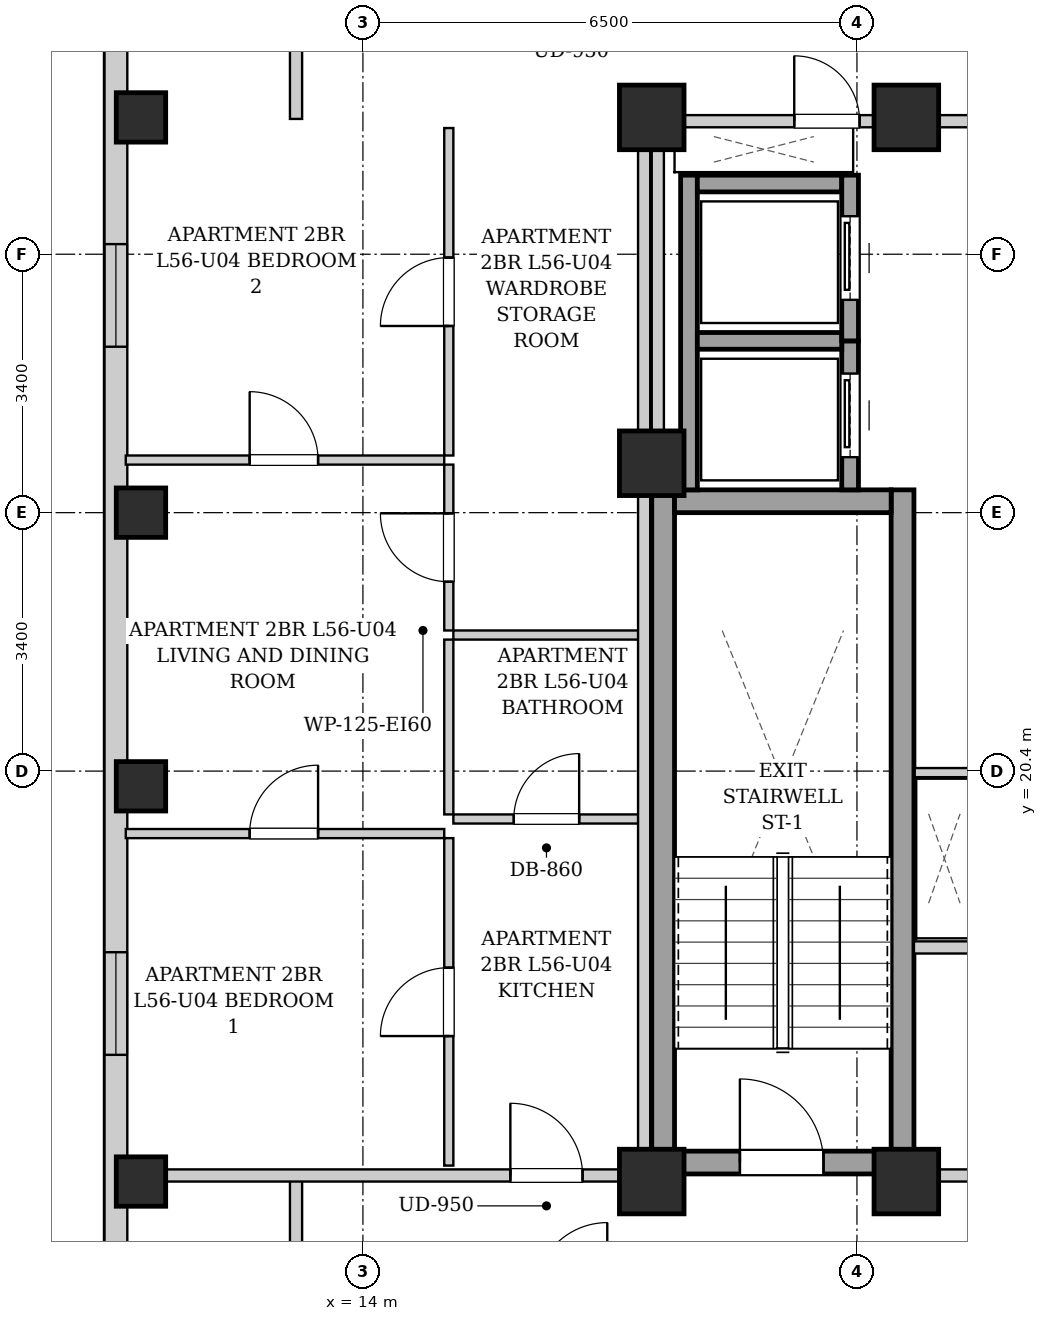
"""IFC4 building model, lengths in metres.
Left out: names, types, materials, properties, quantities, classifications, styles, units other than length and angle.
Written with IfcOpenShell. Run it as: python <this file> out.ifc"""

import sys

from ifc_helpers import new_model, si_unit, direction, frame, frame_2d, origin, origin_2d, place, context, subcontext, project, spatial, rectangle, extrude, element, fill, save


model = new_model("IFC4")
c1 = context("Model", 3, precision=1e-05, world=origin(), true_north=direction((0.0, 1.0)))
c2 = subcontext(c1, "Body", "Model", "MODEL_VIEW")
j1 = project(units=[si_unit("LENGTHUNIT", "METRE"), si_unit("PLANEANGLEUNIT", "RADIAN")], contexts=[c1])
p1 = place(None, origin())
s1 = spatial("IfcSite", under=j1, at=p1, CompositionType="ELEMENT")
p2 = place(p1, origin())
s2 = spatial("IfcBuilding", under=s1, at=p2, CompositionType="ELEMENT")
p3 = place(p2, frame((0.0, 0.0, 194.2)))
s3 = spatial("IfcBuildingStorey", under=s2, at=p3, CompositionType="ELEMENT", Elevation=194.2)
for number, where, z_axis, x_axis in (
    (1, (11.08, 15.0, 0.0), (0.0, 0.0, 1.0), (1.0, 0.0, 0.0)),
    (2, (11.08, 20.2, 0.0), (0.0, 0.0, 1.0), (1.0, 0.0, 0.0)),
    (3, (11.08, 23.8, 0.0), (0.0, 0.0, 1.0), (1.0, 0.0, 0.0)),
    (4, (11.08, 29.0, 0.0), (0.0, 0.0, 1.0), (1.0, 0.0, 0.0)),
):
    element("IfcColumn", number, at=place(p3, frame(where, z_axis=z_axis, x_axis=x_axis)), inside=s3, PredefinedType="COLUMN", context=c2, shape_type="SweptSolid", body=[
        extrude(rectangle(XDim=0.65, YDim=0.65, at=origin_2d()), origin(), (0.0, 0.0, 1.0), 3.3),
    ])
for number, where, z_axis, x_axis in (
    (5, (17.8, 15.0, 0.0), (0.0, 0.0, 1.0), (1.0, 0.0, 0.0)),
    (6, (21.15, 15.0, 0.0), (0.0, 0.0, 1.0), (1.0, 0.0, 0.0)),
    (7, (17.8, 29.0, 0.0), (0.0, 0.0, 1.0), (1.0, 0.0, 0.0)),
    (8, (21.15, 29.0, 0.0), (0.0, 0.0, 1.0), (1.0, 0.0, 0.0)),
    (9, (17.8, 24.45, 0.0), (0.0, 0.0, 1.0), (1.0, 0.0, 0.0)),
):
    element("IfcColumn", number, at=place(p3, frame(where, z_axis=z_axis, x_axis=x_axis)), inside=s3, PredefinedType="COLUMN", context=c2, shape_type="SweptSolid", body=[
        extrude(rectangle(XDim=0.85, YDim=0.85, at=origin_2d()), origin(), (0.0, 0.0, 1.0), 3.3),
    ])
p4 = place(p3, frame((10.75, 6.3, 0.0), z_axis=(0.0, 0.0, 1.0), x_axis=(0.0, 1.0, 0.0)))
e10 = element("IfcWall", 10, at=p4, inside=s3, PredefinedType="SOLIDWALL", context=c2, shape_type="SweptSolid", body=[
    extrude(rectangle(XDim=31.4, YDim=0.3, at=frame_2d((15.7, 0.0))), origin(), (0.0, 0.0, 1.0), 3.04),
])
p5 = place(p4, frame((1.653, 0.0, 0.55)))
e11 = element("IfcOpeningElement", 11, at=p5, cuts=e10, PredefinedType="OPENING", context=c2, shape_type="SweptSolid", body=[
    extrude(rectangle(XDim=1.35, YDim=1.2, at=frame_2d((0.675, 0.6))), frame((0.0, 0.16, 0.0), z_axis=(0.0, -1.0, 0.0), x_axis=(1.0, 0.0, 0.0)), (0.0, 0.0, 1.0), 0.32),
])
p6 = place(p4, frame((28.396, 0.0, 0.55)))
e12 = element("IfcOpeningElement", 12, at=p6, cuts=e10, PredefinedType="OPENING", context=c2, shape_type="SweptSolid", body=[
    extrude(rectangle(XDim=1.35, YDim=1.2, at=frame_2d((0.675, 0.6))), frame((0.0, 0.16, 0.0), z_axis=(0.0, -1.0, 0.0), x_axis=(1.0, 0.0, 0.0)), (0.0, 0.0, 1.0), 0.32),
])
p7 = place(p4, frame((10.367, 0.0, 0.55)))
e13 = element("IfcOpeningElement", 13, at=p7, cuts=e10, PredefinedType="OPENING", context=c2, shape_type="SweptSolid", body=[
    extrude(rectangle(XDim=1.35, YDim=1.2, at=frame_2d((0.675, 0.6))), frame((0.0, 0.16, 0.0), z_axis=(0.0, -1.0, 0.0), x_axis=(1.0, 0.0, 0.0)), (0.0, 0.0, 1.0), 0.32),
])
p8 = place(p4, frame((19.683, 0.0, 0.55)))
e14 = element("IfcOpeningElement", 14, at=p8, cuts=e10, PredefinedType="OPENING", context=c2, shape_type="SweptSolid", body=[
    extrude(rectangle(XDim=1.35, YDim=1.2, at=frame_2d((0.675, 0.6))), frame((0.0, 0.16, 0.0), z_axis=(0.0, -1.0, 0.0), x_axis=(1.0, 0.0, 0.0)), (0.0, 0.0, 1.0), 0.32),
])
for number, where, z_axis, x_axis in (
    (15, (17.95, 15.1, 0.0), (0.0, 0.0, 1.0), (0.0, 1.0, 0.0)),
    (16, (21.1, 15.1, 0.0), (0.0, 0.0, 1.0), (0.0, 1.0, 0.0)),
):
    element("IfcWall", number, at=place(p3, frame(where, z_axis=z_axis, x_axis=x_axis)), inside=s3, PredefinedType="SHEAR", context=c2, shape_type="SweptSolid", body=[
        extrude(rectangle(XDim=9.0, YDim=0.3, at=frame_2d((4.5, 0.0))), origin(), (0.0, 0.0, 1.0), 3.04),
    ])
p9 = place(p3, frame((18.1, 23.95, 0.0), z_axis=(0.0, 0.0, 1.0), x_axis=(1.0, 0.0, 0.0)))
e17 = element("IfcWall", 17, at=p9, inside=s3, PredefinedType="SHEAR", context=c2, shape_type="SweptSolid", body=[
    extrude(rectangle(XDim=2.85, YDim=0.3, at=frame_2d((1.425, 0.0))), origin(), (0.0, 0.0, 1.0), 3.04),
])
p10 = place(p3, frame((18.1, 15.25, 0.0), z_axis=(0.0, 0.0, 1.0), x_axis=(1.0, 0.0, 0.0)))
e18 = element("IfcWall", 18, at=p10, inside=s3, PredefinedType="SHEAR", context=c2, shape_type="SweptSolid", body=[
    extrude(rectangle(XDim=2.85, YDim=0.3, at=frame_2d((1.425, 0.0))), origin(), (0.0, 0.0, 1.0), 3.04),
])
p11 = place(p10, frame((0.86, 0.0, 0.0)))
e19 = element("IfcOpeningElement", 19, at=p11, cuts=e18, PredefinedType="OPENING", context=c2, shape_type="SweptSolid", body=[
    extrude(rectangle(XDim=1.1, YDim=2.05, at=frame_2d((0.55, 1.025))), frame((0.0, 0.16, 0.0), z_axis=(0.0, -1.0, 0.0), x_axis=(1.0, 0.0, 0.0)), (0.0, 0.0, 1.0), 0.32),
])
p12 = place(p3, frame((18.29, 24.1, 0.0), z_axis=(0.0, 0.0, 1.0), x_axis=(0.0, 1.0, 0.0)))
e20 = element("IfcWall", 20, at=p12, inside=s3, PredefinedType="SHEAR", context=c2, shape_type="SweptSolid", body=[
    extrude(rectangle(XDim=4.14, YDim=0.22, at=frame_2d((2.07, 0.0))), origin(), (0.0, 0.0, 1.0), 3.04),
])
p13 = place(p3, frame((20.41, 24.1, 0.0), z_axis=(0.0, 0.0, 1.0), x_axis=(0.0, 1.0, 0.0)))
e21 = element("IfcWall", 21, at=p13, inside=s3, PredefinedType="SHEAR", context=c2, shape_type="SweptSolid", body=[
    extrude(rectangle(XDim=1.96, YDim=0.22, at=frame_2d((0.98, 0.0))), origin(), (0.0, 0.0, 1.0), 3.04),
])
p14 = place(p13, frame((0.43, 0.0, 0.0)))
e22 = element("IfcOpeningElement", 22, at=p14, cuts=e21, PredefinedType="OPENING", context=c2, shape_type="SweptSolid", body=[
    extrude(rectangle(XDim=1.1, YDim=2.15, at=frame_2d((0.55, 1.075))), frame((0.0, 0.12, 0.0), z_axis=(0.0, -1.0, 0.0), x_axis=(1.0, 0.0, 0.0)), (0.0, 0.0, 1.0), 0.24),
])
for number, where, z_axis, x_axis in (
    (23, (18.4, 26.06, 0.0), (0.0, 0.0, 1.0), (1.0, 0.0, 0.0)),
    (24, (18.4, 28.13, 0.0), (0.0, 0.0, 1.0), (1.0, 0.0, 0.0)),
):
    element("IfcWall", number, at=place(p3, frame(where, z_axis=z_axis, x_axis=x_axis)), inside=s3, PredefinedType="SHEAR", context=c2, shape_type="SweptSolid", body=[
        extrude(rectangle(XDim=1.9, YDim=0.22, at=frame_2d((0.95, 0.0))), origin(), (0.0, 0.0, 1.0), 3.04),
    ])
p15 = place(p3, frame((20.41, 26.06, 0.0), z_axis=(0.0, 0.0, 1.0), x_axis=(0.0, 1.0, 0.0)))
e25 = element("IfcWall", 25, at=p15, inside=s3, PredefinedType="SHEAR", context=c2, shape_type="SweptSolid", body=[
    extrude(rectangle(XDim=2.18, YDim=0.22, at=frame_2d((1.09, 0.0))), origin(), (0.0, 0.0, 1.0), 3.04),
])
p16 = place(p15, frame((0.54, 0.0, 0.0)))
e26 = element("IfcOpeningElement", 26, at=p16, cuts=e25, PredefinedType="OPENING", context=c2, shape_type="SweptSolid", body=[
    extrude(rectangle(XDim=1.1, YDim=2.15, at=frame_2d((0.55, 1.075))), frame((0.0, 0.12, 0.0), z_axis=(0.0, -1.0, 0.0), x_axis=(1.0, 0.0, 0.0)), (0.0, 0.0, 1.0), 0.24),
])
p17 = place(p3, frame((21.25, 15.08, 0.0), z_axis=(0.0, 0.0, 1.0), x_axis=(1.0, 0.0, 0.0)))
e27 = element("IfcWall", 27, at=p17, inside=s3, PredefinedType="PARTITIONING", context=c2, shape_type="SweptSolid", body=[
    extrude(rectangle(XDim=8.5, YDim=0.16, at=frame_2d((4.25, 0.0))), origin(), (0.0, 0.0, 1.0), 2.556),
])
p18 = place(p17, frame((3.725, 0.0, 0.0)))
e28 = element("IfcOpeningElement", 28, at=p18, cuts=e27, PredefinedType="OPENING", context=c2, shape_type="SweptSolid", body=[
    extrude(rectangle(XDim=1.05, YDim=2.05, at=frame_2d((0.525, 1.025))), frame((0.0, 0.09, 0.0), z_axis=(0.0, -1.0, 0.0), x_axis=(1.0, 0.0, 0.0)), (0.0, 0.0, 1.0), 0.18),
])
p19 = place(p3, frame((21.25, 18.08, 0.0), z_axis=(0.0, 0.0, 1.0), x_axis=(1.0, 0.0, 0.0)))
e29 = element("IfcWall", 29, at=p19, inside=s3, PredefinedType="PARTITIONING", context=c2, shape_type="SweptSolid", body=[
    extrude(rectangle(XDim=1.1, YDim=0.16, at=frame_2d((0.55, 0.0))), origin(), (0.0, 0.0, 1.0), 3.04),
])
p20 = place(p3, frame((17.88, 24.12, 0.0), z_axis=(0.0, 0.0, 1.0), x_axis=(0.0, 1.0, 0.0)))
e30 = element("IfcWall", 30, at=p20, inside=s3, PredefinedType="PARTITIONING", context=c2, shape_type="SweptSolid", body=[
    extrude(rectangle(XDim=4.76, YDim=0.16, at=frame_2d((2.38, 0.0))), origin(), (0.0, 0.0, 1.0), 3.04),
])
p21 = place(p3, frame((17.96, 28.95, 0.0), z_axis=(0.0, 0.0, 1.0), x_axis=(1.0, 0.0, 0.0)))
e31 = element("IfcWall", 31, at=p21, inside=s3, PredefinedType="PARTITIONING", context=c2, shape_type="SweptSolid", body=[
    extrude(rectangle(XDim=4.29, YDim=0.16, at=frame_2d((2.145, 0.0))), origin(), (0.0, 0.0, 1.0), 2.556),
])
p22 = place(p21, frame((1.715, 0.0, 0.0)))
e32 = element("IfcOpeningElement", 32, at=p22, cuts=e31, PredefinedType="OPENING", context=c2, shape_type="SweptSolid", body=[
    extrude(rectangle(XDim=0.86, YDim=2.05, at=frame_2d((0.43, 1.025))), frame((0.0, 0.09, 0.0), z_axis=(0.0, -1.0, 0.0), x_axis=(1.0, 0.0, 0.0)), (0.0, 0.0, 1.0), 0.18),
])
p23 = place(p3, frame((22.28, 20.38, 0.0), z_axis=(0.0, 0.0, 1.0), x_axis=(-1.0, 0.0, 0.0)))
e33 = element("IfcWall", 33, at=p23, inside=s3, PredefinedType="PARTITIONING", context=c2, shape_type="SweptSolid", body=[
    extrude(rectangle(XDim=1.02, YDim=0.12, at=frame_2d((0.51, 0.0))), origin(), (0.0, 0.0, 1.0), 3.04),
])
for number, where, z_axis, x_axis in (
    (34, (13.12, 13.51, 0.0), (0.0, 0.0, 1.0), (0.0, 1.0, 0.0)),
    (35, (13.12, 28.98, 0.0), (0.0, 0.0, 1.0), (0.0, 1.0, 0.0)),
):
    element("IfcWall", number, at=place(p3, frame(where, z_axis=z_axis, x_axis=x_axis)), inside=s3, PredefinedType="PARTITIONING", context=c2, shape_type="SweptSolid", body=[
        extrude(rectangle(XDim=1.58, YDim=0.16, at=frame_2d((0.79, 0.0))), origin(), (0.0, 0.0, 1.0), 3.04),
    ])
p24 = place(p3, frame((10.88, 15.08, 0.0), z_axis=(0.0, 0.0, 1.0), x_axis=(1.0, 0.0, 0.0)))
e36 = element("IfcWall", 36, at=p24, inside=s3, PredefinedType="PARTITIONING", context=c2, shape_type="SweptSolid", body=[
    extrude(rectangle(XDim=6.88, YDim=0.16, at=frame_2d((3.44, 0.0))), origin(), (0.0, 0.0, 1.0), 2.556),
])
p25 = place(p24, frame((5.06, 0.0, 0.0)))
e37 = element("IfcOpeningElement", 37, at=p25, cuts=e36, PredefinedType="OPENING", context=c2, shape_type="SweptSolid", body=[
    extrude(rectangle(XDim=0.95, YDim=2.1, at=frame_2d((0.475, 1.05))), frame((0.0, 0.09, 0.0), z_axis=(0.0, -1.0, 0.0), x_axis=(1.0, 0.0, 0.0)), (0.0, 0.0, 1.0), 0.18),
])
p26 = place(p3, frame((15.19, 22.19, 0.0), z_axis=(0.0, 0.0, 1.0), x_axis=(1.0, 0.0, 0.0)))
e38 = element("IfcWall", 38, at=p26, inside=s3, PredefinedType="PARTITIONING", context=c2, shape_type="SweptSolid", body=[
    extrude(rectangle(XDim=2.45, YDim=0.12, at=frame_2d((1.225, 0.0))), origin(), (0.0, 0.0, 1.0), 3.04),
])
p27 = place(p3, frame((15.13, 22.25, 0.0), z_axis=(0.0, 0.0, 1.0), x_axis=(0.0, 1.0, 0.0)))
e39 = element("IfcWall", 39, at=p27, inside=s3, PredefinedType="PARTITIONING", context=c2, shape_type="SweptSolid", body=[
    extrude(rectangle(XDim=2.182, YDim=0.12, at=frame_2d((1.091, 0.0))), origin(), (0.0, 0.0, 1.0), 3.04),
])
p28 = place(p27, frame((0.641, 0.0, 0.0)))
e40 = element("IfcOpeningElement", 40, at=p28, cuts=e39, PredefinedType="OPENING", context=c2, shape_type="SweptSolid", body=[
    extrude(rectangle(XDim=0.9, YDim=2.05, at=frame_2d((0.45, 1.025))), frame((0.0, 0.07, 0.0), z_axis=(0.0, -1.0, 0.0), x_axis=(1.0, 0.0, 0.0)), (0.0, 0.0, 1.0), 0.14),
])
p29 = place(p3, frame((15.13, 24.552, 0.0), z_axis=(0.0, 0.0, 1.0), x_axis=(0.0, 1.0, 0.0)))
e41 = element("IfcWall", 41, at=p29, inside=s3, PredefinedType="PARTITIONING", context=c2, shape_type="SweptSolid", body=[
    extrude(rectangle(XDim=4.308, YDim=0.12, at=frame_2d((2.154, 0.0))), origin(), (0.0, 0.0, 1.0), 3.04),
])
p30 = place(p29, frame((1.704, 0.0, 0.0)))
e42 = element("IfcOpeningElement", 42, at=p30, cuts=e41, PredefinedType="OPENING", context=c2, shape_type="SweptSolid", body=[
    extrude(rectangle(XDim=0.9, YDim=2.05, at=frame_2d((0.45, 1.025))), frame((0.0, 0.07, 0.0), z_axis=(0.0, -1.0, 0.0), x_axis=(1.0, 0.0, 0.0)), (0.0, 0.0, 1.0), 0.14),
])
p31 = place(p3, frame((15.19, 19.77, 0.0), z_axis=(0.0, 0.0, 1.0), x_axis=(1.0, 0.0, 0.0)))
e43 = element("IfcWall", 43, at=p31, inside=s3, PredefinedType="PARTITIONING", context=c2, shape_type="SweptSolid", body=[
    extrude(rectangle(XDim=2.45, YDim=0.12, at=frame_2d((1.225, 0.0))), origin(), (0.0, 0.0, 1.0), 3.04),
])
p32 = place(p31, frame((0.795, 0.0, 0.0)))
e44 = element("IfcOpeningElement", 44, at=p32, cuts=e43, PredefinedType="OPENING", context=c2, shape_type="SweptSolid", body=[
    extrude(rectangle(XDim=0.86, YDim=2.05, at=frame_2d((0.43, 1.025))), frame((0.0, 0.07, 0.0), z_axis=(0.0, -1.0, 0.0), x_axis=(1.0, 0.0, 0.0)), (0.0, 0.0, 1.0), 0.14),
])
p33 = place(p3, frame((15.13, 19.83, 0.0), z_axis=(0.0, 0.0, 1.0), x_axis=(0.0, 1.0, 0.0)))
e45 = element("IfcWall", 45, at=p33, inside=s3, PredefinedType="PARTITIONING", context=c2, shape_type="SweptSolid", body=[
    extrude(rectangle(XDim=2.3, YDim=0.12, at=frame_2d((1.15, 0.0))), origin(), (0.0, 0.0, 1.0), 3.04),
])
p34 = place(p3, frame((15.13, 15.21, 0.0), z_axis=(0.0, 0.0, 1.0), x_axis=(0.0, 1.0, 0.0)))
e46 = element("IfcWall", 46, at=p34, inside=s3, PredefinedType="PARTITIONING", context=c2, shape_type="SweptSolid", body=[
    extrude(rectangle(XDim=4.308, YDim=0.12, at=frame_2d((2.154, 0.0))), origin(), (0.0, 0.0, 1.0), 3.04),
])
p35 = place(p34, frame((1.704, 0.0, 0.0)))
e47 = element("IfcOpeningElement", 47, at=p35, cuts=e46, PredefinedType="OPENING", context=c2, shape_type="SweptSolid", body=[
    extrude(rectangle(XDim=0.9, YDim=2.05, at=frame_2d((0.45, 1.025))), frame((0.0, 0.07, 0.0), z_axis=(0.0, -1.0, 0.0), x_axis=(1.0, 0.0, 0.0)), (0.0, 0.0, 1.0), 0.14),
])
p36 = place(p3, frame((10.88, 19.578, 0.0), z_axis=(0.0, 0.0, 1.0), x_axis=(1.0, 0.0, 0.0)))
e48 = element("IfcWall", 48, at=p36, inside=s3, PredefinedType="PARTITIONING", context=c2, shape_type="SweptSolid", body=[
    extrude(rectangle(XDim=4.19, YDim=0.12, at=frame_2d((2.095, 0.0))), origin(), (0.0, 0.0, 1.0), 3.04),
])
p37 = place(p36, frame((1.63, 0.0, 0.0)))
e49 = element("IfcOpeningElement", 49, at=p37, cuts=e48, PredefinedType="OPENING", context=c2, shape_type="SweptSolid", body=[
    extrude(rectangle(XDim=0.9, YDim=2.05, at=frame_2d((0.45, 1.025))), frame((0.0, 0.07, 0.0), z_axis=(0.0, -1.0, 0.0), x_axis=(1.0, 0.0, 0.0)), (0.0, 0.0, 1.0), 0.14),
])
p38 = place(p3, frame((10.88, 24.492, 0.0), z_axis=(0.0, 0.0, 1.0), x_axis=(1.0, 0.0, 0.0)))
e50 = element("IfcWall", 50, at=p38, inside=s3, PredefinedType="PARTITIONING", context=c2, shape_type="SweptSolid", body=[
    extrude(rectangle(XDim=4.19, YDim=0.12, at=frame_2d((2.095, 0.0))), origin(), (0.0, 0.0, 1.0), 2.722),
])
p39 = place(p38, frame((1.63, 0.0, 0.0)))
e51 = element("IfcOpeningElement", 51, at=p39, cuts=e50, PredefinedType="OPENING", context=c2, shape_type="SweptSolid", body=[
    extrude(rectangle(XDim=0.9, YDim=2.05, at=frame_2d((0.45, 1.025))), frame((0.0, 0.07, 0.0), z_axis=(0.0, -1.0, 0.0), x_axis=(1.0, 0.0, 0.0)), (0.0, 0.0, 1.0), 0.14),
])
p40 = place(p3, frame((17.7, 15.02, 0.0), z_axis=(0.0, 0.0, 1.0), x_axis=(0.0, 1.0, 0.0)))
e52 = element("IfcWall", 52, at=p40, inside=s3, PredefinedType="PARTITIONING", context=c2, shape_type="SweptSolid", body=[
    extrude(rectangle(XDim=13.98, YDim=0.16, at=frame_2d((6.99, 0.0))), origin(), (0.0, 0.0, 1.0), 3.04),
])
p41 = place(p11, origin())
e53 = element("IfcDoor", 53, at=p41, inside=s3, OperationType="SINGLE_SWING_LEFT", PredefinedType="DOOR", context=c2, shape_type="SweptSolid", body=[
    extrude(rectangle(XDim=1.1, YDim=2.05, at=frame_2d((0.55, 1.025))), frame((0.0, 0.025, 0.0), z_axis=(0.0, -1.0, 0.0), x_axis=(1.0, 0.0, 0.0)), (0.0, 0.0, 1.0), 0.05),
])
fill(e19, e53)
p42 = place(p14, origin())
e54 = element("IfcDoor", 54, at=p42, inside=s3, OperationType="SLIDING_TO_LEFT", PredefinedType="DOOR", context=c2, shape_type="SweptSolid", body=[
    extrude(rectangle(XDim=1.1, YDim=2.15, at=frame_2d((0.55, 1.075))), frame((0.0, 0.025, 0.0), z_axis=(0.0, -1.0, 0.0), x_axis=(1.0, 0.0, 0.0)), (0.0, 0.0, 1.0), 0.05),
])
fill(e22, e54)
p43 = place(p16, origin())
e55 = element("IfcDoor", 55, at=p43, inside=s3, OperationType="SLIDING_TO_LEFT", PredefinedType="DOOR", context=c2, shape_type="SweptSolid", body=[
    extrude(rectangle(XDim=1.1, YDim=2.15, at=frame_2d((0.55, 1.075))), frame((0.0, 0.025, 0.0), z_axis=(0.0, -1.0, 0.0), x_axis=(1.0, 0.0, 0.0)), (0.0, 0.0, 1.0), 0.05),
])
fill(e26, e55)
p44 = place(p22, origin())
e56 = element("IfcDoor", 56, at=p44, inside=s3, OperationType="SINGLE_SWING_LEFT", PredefinedType="DOOR", context=c2, shape_type="SweptSolid", body=[
    extrude(rectangle(XDim=0.86, YDim=2.05, at=frame_2d((0.43, 1.025))), frame((0.0, 0.025, 0.0), z_axis=(0.0, -1.0, 0.0), x_axis=(1.0, 0.0, 0.0)), (0.0, 0.0, 1.0), 0.05),
])
fill(e32, e56)
p45 = place(p25, origin())
e57 = element("IfcDoor", 57, at=p45, inside=s3, OperationType="SINGLE_SWING_LEFT", PredefinedType="DOOR", context=c2, shape_type="SweptSolid", body=[
    extrude(rectangle(XDim=0.95, YDim=2.1, at=frame_2d((0.475, 1.05))), frame((0.0, 0.025, 0.0), z_axis=(0.0, -1.0, 0.0), x_axis=(1.0, 0.0, 0.0)), (0.0, 0.0, 1.0), 0.05),
])
fill(e37, e57)
p46 = place(p28, origin())
e58 = element("IfcDoor", 58, at=p46, inside=s3, OperationType="SINGLE_SWING_RIGHT", PredefinedType="DOOR", context=c2, shape_type="SweptSolid", body=[
    extrude(rectangle(XDim=0.9, YDim=2.05, at=frame_2d((0.45, 1.025))), frame((0.0, 0.025, 0.0), z_axis=(0.0, -1.0, 0.0), x_axis=(1.0, 0.0, 0.0)), (0.0, 0.0, 1.0), 0.05),
])
fill(e40, e58)
p47 = place(p30, origin())
e59 = element("IfcDoor", 59, at=p47, inside=s3, OperationType="SINGLE_SWING_LEFT", PredefinedType="DOOR", context=c2, shape_type="SweptSolid", body=[
    extrude(rectangle(XDim=0.9, YDim=2.05, at=frame_2d((0.45, 1.025))), frame((0.0, 0.025, 0.0), z_axis=(0.0, -1.0, 0.0), x_axis=(1.0, 0.0, 0.0)), (0.0, 0.0, 1.0), 0.05),
])
fill(e42, e59)
p48 = place(p32, origin())
e60 = element("IfcDoor", 60, at=p48, inside=s3, OperationType="SINGLE_SWING_RIGHT", PredefinedType="DOOR", context=c2, shape_type="SweptSolid", body=[
    extrude(rectangle(XDim=0.86, YDim=2.05, at=frame_2d((0.43, 1.025))), frame((0.0, 0.025, 0.0), z_axis=(0.0, -1.0, 0.0), x_axis=(1.0, 0.0, 0.0)), (0.0, 0.0, 1.0), 0.05),
])
fill(e44, e60)
p49 = place(p35, origin())
e61 = element("IfcDoor", 61, at=p49, inside=s3, OperationType="SINGLE_SWING_LEFT", PredefinedType="DOOR", context=c2, shape_type="SweptSolid", body=[
    extrude(rectangle(XDim=0.9, YDim=2.05, at=frame_2d((0.45, 1.025))), frame((0.0, 0.025, 0.0), z_axis=(0.0, -1.0, 0.0), x_axis=(1.0, 0.0, 0.0)), (0.0, 0.0, 1.0), 0.05),
])
fill(e47, e61)
p50 = place(p37, origin())
e62 = element("IfcDoor", 62, at=p50, inside=s3, OperationType="SINGLE_SWING_RIGHT", PredefinedType="DOOR", context=c2, shape_type="SweptSolid", body=[
    extrude(rectangle(XDim=0.9, YDim=2.05, at=frame_2d((0.45, 1.025))), frame((0.0, 0.025, 0.0), z_axis=(0.0, -1.0, 0.0), x_axis=(1.0, 0.0, 0.0)), (0.0, 0.0, 1.0), 0.05),
])
fill(e49, e62)
p51 = place(p39, origin())
e63 = element("IfcDoor", 63, at=p51, inside=s3, OperationType="SINGLE_SWING_LEFT", PredefinedType="DOOR", context=c2, shape_type="SweptSolid", body=[
    extrude(rectangle(XDim=0.9, YDim=2.05, at=frame_2d((0.45, 1.025))), frame((0.0, 0.025, 0.0), z_axis=(0.0, -1.0, 0.0), x_axis=(1.0, 0.0, 0.0)), (0.0, 0.0, 1.0), 0.05),
])
fill(e51, e63)
p52 = place(p7, origin())
e64 = element("IfcWindow", 64, at=p52, inside=s3, PartitioningType="SINGLE_PANEL", PredefinedType="WINDOW", context=c2, shape_type="SweptSolid", body=[
    extrude(rectangle(XDim=1.35, YDim=1.2, at=frame_2d((0.675, 0.6))), frame((0.0, 0.03, 0.0), z_axis=(0.0, -1.0, 0.0), x_axis=(1.0, 0.0, 0.0)), (0.0, 0.0, 1.0), 0.06),
])
fill(e13, e64)
p53 = place(p8, origin())
e65 = element("IfcWindow", 65, at=p53, inside=s3, PartitioningType="SINGLE_PANEL", PredefinedType="WINDOW", context=c2, shape_type="SweptSolid", body=[
    extrude(rectangle(XDim=1.35, YDim=1.2, at=frame_2d((0.675, 0.6))), frame((0.0, 0.03, 0.0), z_axis=(0.0, -1.0, 0.0), x_axis=(1.0, 0.0, 0.0)), (0.0, 0.0, 1.0), 0.06),
])
fill(e14, e65)
save(model, sys.argv[1])
